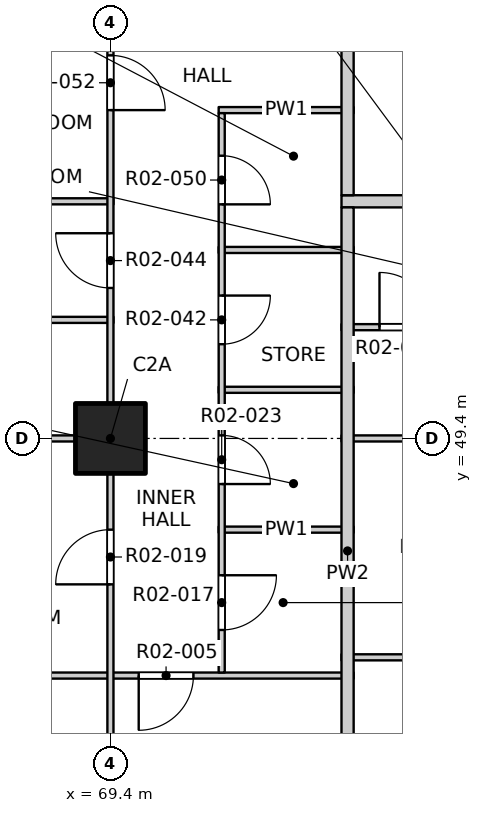
"""IFC4 building model, lengths in metres.
Left out: names, types, materials, properties, quantities, classifications, styles, units other than length and angle.
Written with IfcOpenShell. Run it as: python <this file> out.ifc"""

import sys

from ifc_helpers import new_model, si_unit, direction, frame, frame_2d, origin, origin_2d, place, context, subcontext, project, spatial, rectangle, extrude, element, fill, save


model = new_model("IFC4")
c1 = context("Model", 3, precision=1e-05, world=origin(), true_north=direction((0.0, 1.0)))
c2 = subcontext(c1, "Body", "Model", "MODEL_VIEW")
j1 = project(units=[si_unit("LENGTHUNIT", "METRE"), si_unit("PLANEANGLEUNIT", "RADIAN")], contexts=[c1])
p1 = place(None, origin())
s1 = spatial("IfcSite", under=j1, at=p1, CompositionType="ELEMENT")
p2 = place(p1, origin())
s2 = spatial("IfcBuilding", under=s1, at=p2, CompositionType="ELEMENT")
p3 = place(p2, frame((0.0, 0.0, 29.7)))
s3 = spatial("IfcBuildingStorey", under=s2, at=p3, CompositionType="ELEMENT", Elevation=29.7)
p4 = place(p3, frame((69.4, 49.4, -0.25), z_axis=(0.0, 0.0, 1.0), x_axis=(1.0, 0.0, 0.0)))
e1 = element("IfcColumn", 1, at=p4, inside=s3, PredefinedType="COLUMN", context=c2, shape_type="SweptSolid", body=[
    extrude(rectangle(XDim=1.15, YDim=1.15, at=origin_2d()), origin(), (0.0, 0.0, 1.0), 3.4),
])
p5 = place(p3, frame((61.9, 45.5, 0.0), z_axis=(0.0, 0.0, 1.0), x_axis=(1.0, 0.0, 0.0)))
e2 = element("IfcWall", 2, at=p5, inside=s3, PredefinedType="PARTITIONING", context=c2, shape_type="SweptSolid", body=[
    extrude(rectangle(XDim=11.5, YDim=0.1, at=frame_2d((5.75, 0.0))), origin(), (0.0, 0.0, 1.0), 3.15),
])
p6 = place(p5, frame((7.965, 0.0, 0.0)))
e3 = element("IfcOpeningElement", 3, at=p6, cuts=e2, PredefinedType="OPENING", context=c2, shape_type="SweptSolid", body=[
    extrude(rectangle(XDim=0.9, YDim=2.1, at=frame_2d((0.45, 1.05))), frame((0.0, 0.06, 0.0), z_axis=(0.0, -1.0, 0.0), x_axis=(1.0, 0.0, 0.0)), (0.0, 0.0, 1.0), 0.12),
])
p7 = place(p3, frame((73.2, 45.8, 0.0), z_axis=(0.0, 0.0, 1.0), x_axis=(1.0, 0.0, 0.0)))
e4 = element("IfcWall", 4, at=p7, inside=s3, PredefinedType="PARTITIONING", context=c2, shape_type="SweptSolid", body=[
    extrude(rectangle(XDim=8.0, YDim=0.1, at=frame_2d((4.0, 0.0))), origin(), (0.0, 0.0, 1.0), 3.15),
])
p8 = place(p7, frame((1.45, 0.0, 0.0)))
e5 = element("IfcOpeningElement", 5, at=p8, cuts=e4, PredefinedType="OPENING", context=c2, shape_type="SweptSolid", body=[
    extrude(rectangle(XDim=1.2, YDim=2.1, at=frame_2d((0.6, 1.05))), frame((0.0, 0.06, 0.0), z_axis=(0.0, -1.0, 0.0), x_axis=(1.0, 0.0, 0.0)), (0.0, 0.0, 1.0), 0.12),
])
p9 = place(p7, frame((4.525, 0.0, 0.0)))
e6 = element("IfcOpeningElement", 6, at=p9, cuts=e4, PredefinedType="OPENING", context=c2, shape_type="SweptSolid", body=[
    extrude(rectangle(XDim=0.9, YDim=2.1, at=frame_2d((0.45, 1.05))), frame((0.0, 0.06, 0.0), z_axis=(0.0, -1.0, 0.0), x_axis=(1.0, 0.0, 0.0)), (0.0, 0.0, 1.0), 0.12),
])
p10 = place(p7, frame((6.475, 0.0, 0.0)))
e7 = element("IfcOpeningElement", 7, at=p10, cuts=e4, PredefinedType="OPENING", context=c2, shape_type="SweptSolid", body=[
    extrude(rectangle(XDim=0.9, YDim=2.1, at=frame_2d((0.45, 1.05))), frame((0.0, 0.06, 0.0), z_axis=(0.0, -1.0, 0.0), x_axis=(1.0, 0.0, 0.0)), (0.0, 0.0, 1.0), 0.12),
])
p11 = place(p3, frame((71.18, 47.9, 0.0), z_axis=(0.0, 0.0, 1.0), x_axis=(1.0, 0.0, 0.0)))
e8 = element("IfcWall", 8, at=p11, inside=s3, PredefinedType="PARTITIONING", context=c2, shape_type="SweptSolid", body=[
    extrude(rectangle(XDim=2.22, YDim=0.1, at=frame_2d((1.11, 0.0))), origin(), (0.0, 0.0, 1.0), 3.15),
])
p12 = place(p3, frame((61.9, 49.4, 0.0), z_axis=(0.0, 0.0, 1.0), x_axis=(1.0, 0.0, 0.0)))
e9 = element("IfcWall", 9, at=p12, inside=s3, PredefinedType="PARTITIONING", context=c2, shape_type="SweptSolid", body=[
    extrude(rectangle(XDim=7.55, YDim=0.1, at=frame_2d((3.775, 0.0))), origin(), (0.0, 0.0, 1.0), 2.55),
])
p13 = place(p3, frame((73.2, 49.4, 0.0), z_axis=(0.0, 0.0, 1.0), x_axis=(1.0, 0.0, 0.0)))
e10 = element("IfcWall", 10, at=p13, inside=s3, PredefinedType="PARTITIONING", context=c2, shape_type="SweptSolid", body=[
    extrude(rectangle(XDim=23.6, YDim=0.1, at=frame_2d((11.8, 0.0))), origin(), (0.0, 0.0, 1.0), 3.15),
])
p14 = place(p13, frame((1.6, 0.0, 0.0)))
e11 = element("IfcOpeningElement", 11, at=p14, cuts=e10, PredefinedType="OPENING", context=c2, shape_type="SweptSolid", body=[
    extrude(rectangle(XDim=0.9, YDim=2.1, at=frame_2d((0.45, 1.05))), frame((0.0, 0.06, 0.0), z_axis=(0.0, -1.0, 0.0), x_axis=(1.0, 0.0, 0.0)), (0.0, 0.0, 1.0), 0.12),
])
p15 = place(p13, frame((6.475, 0.0, 0.0)))
e12 = element("IfcOpeningElement", 12, at=p15, cuts=e10, PredefinedType="OPENING", context=c2, shape_type="SweptSolid", body=[
    extrude(rectangle(XDim=0.9, YDim=2.1, at=frame_2d((0.45, 1.05))), frame((0.0, 0.06, 0.0), z_axis=(0.0, -1.0, 0.0), x_axis=(1.0, 0.0, 0.0)), (0.0, 0.0, 1.0), 0.12),
])
p16 = place(p13, frame((10.2, 0.0, 0.0)))
e13 = element("IfcOpeningElement", 13, at=p16, cuts=e10, PredefinedType="OPENING", context=c2, shape_type="SweptSolid", body=[
    extrude(rectangle(XDim=0.9, YDim=2.1, at=frame_2d((0.45, 1.05))), frame((0.0, 0.06, 0.0), z_axis=(0.0, -1.0, 0.0), x_axis=(1.0, 0.0, 0.0)), (0.0, 0.0, 1.0), 0.12),
])
p17 = place(p13, frame((13.3, 0.0, 0.0)))
e14 = element("IfcOpeningElement", 14, at=p17, cuts=e10, PredefinedType="OPENING", context=c2, shape_type="SweptSolid", body=[
    extrude(rectangle(XDim=0.9, YDim=2.1, at=frame_2d((0.45, 1.05))), frame((0.0, 0.06, 0.0), z_axis=(0.0, -1.0, 0.0), x_axis=(1.0, 0.0, 0.0)), (0.0, 0.0, 1.0), 0.12),
])
p18 = place(p13, frame((18.0, 0.0, 0.0)))
e15 = element("IfcOpeningElement", 15, at=p18, cuts=e10, PredefinedType="OPENING", context=c2, shape_type="SweptSolid", body=[
    extrude(rectangle(XDim=0.9, YDim=2.1, at=frame_2d((0.45, 1.05))), frame((0.0, 0.06, 0.0), z_axis=(0.0, -1.0, 0.0), x_axis=(1.0, 0.0, 0.0)), (0.0, 0.0, 1.0), 0.12),
])
p19 = place(p13, frame((21.1, 0.0, 0.0)))
e16 = element("IfcOpeningElement", 16, at=p19, cuts=e10, PredefinedType="OPENING", context=c2, shape_type="SweptSolid", body=[
    extrude(rectangle(XDim=0.9, YDim=2.1, at=frame_2d((0.45, 1.05))), frame((0.0, 0.06, 0.0), z_axis=(0.0, -1.0, 0.0), x_axis=(1.0, 0.0, 0.0)), (0.0, 0.0, 1.0), 0.12),
])
p20 = place(p3, frame((71.18, 50.2, 0.0), z_axis=(0.0, 0.0, 1.0), x_axis=(1.0, 0.0, 0.0)))
e17 = element("IfcWall", 17, at=p20, inside=s3, PredefinedType="PARTITIONING", context=c2, shape_type="SweptSolid", body=[
    extrude(rectangle(XDim=2.22, YDim=0.1, at=frame_2d((1.11, 0.0))), origin(), (0.0, 0.0, 1.0), 3.15),
])
p21 = place(p3, frame((73.2, 51.23, 0.0), z_axis=(0.0, 0.0, 1.0), x_axis=(1.0, 0.0, 0.0)))
e18 = element("IfcWall", 18, at=p21, inside=s3, PredefinedType="PARTITIONING", context=c2, shape_type="SweptSolid", body=[
    extrude(rectangle(XDim=4.7, YDim=0.1, at=frame_2d((2.35, 0.0))), origin(), (0.0, 0.0, 1.0), 3.15),
])
p22 = place(p21, frame((0.625, 0.0, 0.0)))
e19 = element("IfcOpeningElement", 19, at=p22, cuts=e18, PredefinedType="OPENING", context=c2, shape_type="SweptSolid", body=[
    extrude(rectangle(XDim=0.9, YDim=2.1, at=frame_2d((0.45, 1.05))), frame((0.0, 0.06, 0.0), z_axis=(0.0, -1.0, 0.0), x_axis=(1.0, 0.0, 0.0)), (0.0, 0.0, 1.0), 0.12),
])
p23 = place(p21, frame((2.9, 0.0, 0.0)))
e20 = element("IfcOpeningElement", 20, at=p23, cuts=e18, PredefinedType="OPENING", context=c2, shape_type="SweptSolid", body=[
    extrude(rectangle(XDim=0.9, YDim=2.1, at=frame_2d((0.45, 1.05))), frame((0.0, 0.06, 0.0), z_axis=(0.0, -1.0, 0.0), x_axis=(1.0, 0.0, 0.0)), (0.0, 0.0, 1.0), 0.12),
])
p24 = place(p3, frame((66.05, 51.35, 0.0), z_axis=(0.0, 0.0, 1.0), x_axis=(1.0, 0.0, 0.0)))
e21 = element("IfcWall", 21, at=p24, inside=s3, PredefinedType="PARTITIONING", context=c2, shape_type="SweptSolid", body=[
    extrude(rectangle(XDim=3.4, YDim=0.1, at=frame_2d((1.7, 0.0))), origin(), (0.0, 0.0, 1.0), 3.15),
])
p25 = place(p3, frame((71.18, 52.5, 0.0), z_axis=(0.0, 0.0, 1.0), x_axis=(1.0, 0.0, 0.0)))
e22 = element("IfcWall", 22, at=p25, inside=s3, PredefinedType="PARTITIONING", context=c2, shape_type="SweptSolid", body=[
    extrude(rectangle(XDim=2.22, YDim=0.1, at=frame_2d((1.11, 0.0))), origin(), (0.0, 0.0, 1.0), 3.15),
])
p26 = place(p3, frame((61.9, 53.3, 0.0), z_axis=(0.0, 0.0, 1.0), x_axis=(1.0, 0.0, 0.0)))
e23 = element("IfcWall", 23, at=p26, inside=s3, PredefinedType="PARTITIONING", context=c2, shape_type="SweptSolid", body=[
    extrude(rectangle(XDim=7.55, YDim=0.1, at=frame_2d((3.775, 0.0))), origin(), (0.0, 0.0, 1.0), 3.15),
])
p27 = place(p3, frame((73.2, 53.3, 0.0), z_axis=(0.0, 0.0, 1.0), x_axis=(1.0, 0.0, 0.0)))
e24 = element("IfcWall", 24, at=p27, inside=s3, PredefinedType="PARTITIONING", context=c2, shape_type="SweptSolid", body=[
    extrude(rectangle(XDim=23.6, YDim=0.2, at=frame_2d((11.8, 0.0))), origin(), (0.0, 0.0, 1.0), 3.15),
])
p28 = place(p27, frame((5.925, 0.0, 0.0)))
e25 = element("IfcOpeningElement", 25, at=p28, cuts=e24, PredefinedType="OPENING", context=c2, shape_type="SweptSolid", body=[
    extrude(rectangle(XDim=1.0, YDim=2.1, at=frame_2d((0.5, 1.05))), frame((0.0, 0.11, 0.0), z_axis=(0.0, -1.0, 0.0), x_axis=(1.0, 0.0, 0.0)), (0.0, 0.0, 1.0), 0.22),
])
p29 = place(p27, frame((17.925, 0.0, 0.0)))
e26 = element("IfcOpeningElement", 26, at=p29, cuts=e24, PredefinedType="OPENING", context=c2, shape_type="SweptSolid", body=[
    extrude(rectangle(XDim=1.0, YDim=2.1, at=frame_2d((0.5, 1.05))), frame((0.0, 0.11, 0.0), z_axis=(0.0, -1.0, 0.0), x_axis=(1.0, 0.0, 0.0)), (0.0, 0.0, 1.0), 0.22),
])
p30 = place(p3, frame((71.18, 54.8, 0.0), z_axis=(0.0, 0.0, 1.0), x_axis=(1.0, 0.0, 0.0)))
e27 = element("IfcWall", 27, at=p30, inside=s3, PredefinedType="PARTITIONING", context=c2, shape_type="SweptSolid", body=[
    extrude(rectangle(XDim=2.22, YDim=0.1, at=frame_2d((1.11, 0.0))), origin(), (0.0, 0.0, 1.0), 3.15),
])
p31 = place(p3, frame((69.4, 41.9, 0.0), z_axis=(0.0, 0.0, 1.0), x_axis=(0.0, 1.0, 0.0)))
e28 = element("IfcWall", 28, at=p31, inside=s3, PredefinedType="PARTITIONING", context=c2, shape_type="SweptSolid", body=[
    extrude(rectangle(XDim=7.5, YDim=0.1, at=frame_2d((3.75, 0.0))), origin(), (0.0, 0.0, 1.0), 2.55),
])
p32 = place(p31, frame((1.2, 0.0, 0.0)))
e29 = element("IfcOpeningElement", 29, at=p32, cuts=e28, PredefinedType="OPENING", context=c2, shape_type="SweptSolid", body=[
    extrude(rectangle(XDim=0.9, YDim=2.1, at=frame_2d((0.45, 1.05))), frame((0.0, 0.06, 0.0), z_axis=(0.0, -1.0, 0.0), x_axis=(1.0, 0.0, 0.0)), (0.0, 0.0, 1.0), 0.12),
])
p33 = place(p31, frame((5.1, 0.0, 0.0)))
e30 = element("IfcOpeningElement", 30, at=p33, cuts=e28, PredefinedType="OPENING", context=c2, shape_type="SweptSolid", body=[
    extrude(rectangle(XDim=0.9, YDim=2.1, at=frame_2d((0.45, 1.05))), frame((0.0, 0.06, 0.0), z_axis=(0.0, -1.0, 0.0), x_axis=(1.0, 0.0, 0.0)), (0.0, 0.0, 1.0), 0.12),
])
p34 = place(p3, frame((69.4, 49.4, 0.0), z_axis=(0.0, 0.0, 1.0), x_axis=(0.0, 1.0, 0.0)))
e31 = element("IfcWall", 31, at=p34, inside=s3, PredefinedType="PARTITIONING", context=c2, shape_type="SweptSolid", body=[
    extrude(rectangle(XDim=31.2, YDim=0.1, at=frame_2d((15.6, 0.0))), origin(), (0.0, 0.0, 1.0), 3.15),
])
p35 = place(p34, frame((2.475, 0.0, 0.0)))
e32 = element("IfcOpeningElement", 32, at=p35, cuts=e31, PredefinedType="OPENING", context=c2, shape_type="SweptSolid", body=[
    extrude(rectangle(XDim=0.9, YDim=2.1, at=frame_2d((0.45, 1.05))), frame((0.0, 0.06, 0.0), z_axis=(0.0, -1.0, 0.0), x_axis=(1.0, 0.0, 0.0)), (0.0, 0.0, 1.0), 0.12),
])
p36 = place(p34, frame((5.4, 0.0, 0.0)))
e33 = element("IfcOpeningElement", 33, at=p36, cuts=e31, PredefinedType="OPENING", context=c2, shape_type="SweptSolid", body=[
    extrude(rectangle(XDim=0.9, YDim=2.1, at=frame_2d((0.45, 1.05))), frame((0.0, 0.06, 0.0), z_axis=(0.0, -1.0, 0.0), x_axis=(1.0, 0.0, 0.0)), (0.0, 0.0, 1.0), 0.12),
])
p37 = place(p34, frame((10.275, 0.0, 0.0)))
e34 = element("IfcOpeningElement", 34, at=p37, cuts=e31, PredefinedType="OPENING", context=c2, shape_type="SweptSolid", body=[
    extrude(rectangle(XDim=0.9, YDim=2.1, at=frame_2d((0.45, 1.05))), frame((0.0, 0.06, 0.0), z_axis=(0.0, -1.0, 0.0), x_axis=(1.0, 0.0, 0.0)), (0.0, 0.0, 1.0), 0.12),
])
p38 = place(p34, frame((14.0, 0.0, 0.0)))
e35 = element("IfcOpeningElement", 35, at=p38, cuts=e31, PredefinedType="OPENING", context=c2, shape_type="SweptSolid", body=[
    extrude(rectangle(XDim=0.9, YDim=2.1, at=frame_2d((0.45, 1.05))), frame((0.0, 0.06, 0.0), z_axis=(0.0, -1.0, 0.0), x_axis=(1.0, 0.0, 0.0)), (0.0, 0.0, 1.0), 0.12),
])
p39 = place(p34, frame((17.1, 0.0, 0.0)))
e36 = element("IfcOpeningElement", 36, at=p39, cuts=e31, PredefinedType="OPENING", context=c2, shape_type="SweptSolid", body=[
    extrude(rectangle(XDim=0.9, YDim=2.1, at=frame_2d((0.45, 1.05))), frame((0.0, 0.06, 0.0), z_axis=(0.0, -1.0, 0.0), x_axis=(1.0, 0.0, 0.0)), (0.0, 0.0, 1.0), 0.12),
])
p40 = place(p34, frame((21.8, 0.0, 0.0)))
e37 = element("IfcOpeningElement", 37, at=p40, cuts=e31, PredefinedType="OPENING", context=c2, shape_type="SweptSolid", body=[
    extrude(rectangle(XDim=0.9, YDim=2.1, at=frame_2d((0.45, 1.05))), frame((0.0, 0.06, 0.0), z_axis=(0.0, -1.0, 0.0), x_axis=(1.0, 0.0, 0.0)), (0.0, 0.0, 1.0), 0.12),
])
p41 = place(p34, frame((25.875, 0.0, 0.0)))
e38 = element("IfcOpeningElement", 38, at=p41, cuts=e31, PredefinedType="OPENING", context=c2, shape_type="SweptSolid", body=[
    extrude(rectangle(XDim=0.9, YDim=2.1, at=frame_2d((0.45, 1.05))), frame((0.0, 0.06, 0.0), z_axis=(0.0, -1.0, 0.0), x_axis=(1.0, 0.0, 0.0)), (0.0, 0.0, 1.0), 0.12),
])
p42 = place(p34, frame((29.6, 0.0, 0.0)))
e39 = element("IfcOpeningElement", 39, at=p42, cuts=e31, PredefinedType="OPENING", context=c2, shape_type="SweptSolid", body=[
    extrude(rectangle(XDim=0.9, YDim=2.1, at=frame_2d((0.45, 1.05))), frame((0.0, 0.06, 0.0), z_axis=(0.0, -1.0, 0.0), x_axis=(1.0, 0.0, 0.0)), (0.0, 0.0, 1.0), 0.12),
])
p43 = place(p3, frame((71.23, 45.55, 0.0), z_axis=(0.0, 0.0, 1.0), x_axis=(0.0, 1.0, 0.0)))
e40 = element("IfcWall", 40, at=p43, inside=s3, PredefinedType="PARTITIONING", context=c2, shape_type="SweptSolid", body=[
    extrude(rectangle(XDim=9.2, YDim=0.1, at=frame_2d((4.6, 0.0))), origin(), (0.0, 0.0, 1.0), 3.15),
])
p44 = place(p43, frame((0.7, 0.0, 0.0)))
e41 = element("IfcOpeningElement", 41, at=p44, cuts=e40, PredefinedType="OPENING", context=c2, shape_type="SweptSolid", body=[
    extrude(rectangle(XDim=0.9, YDim=2.1, at=frame_2d((0.45, 1.05))), frame((0.0, 0.06, 0.0), z_axis=(0.0, -1.0, 0.0), x_axis=(1.0, 0.0, 0.0)), (0.0, 0.0, 1.0), 0.12),
])
p45 = place(p43, frame((3.1, 0.0, 0.0)))
e42 = element("IfcOpeningElement", 42, at=p45, cuts=e40, PredefinedType="OPENING", context=c2, shape_type="SweptSolid", body=[
    extrude(rectangle(XDim=0.8, YDim=2.1, at=frame_2d((0.4, 1.05))), frame((0.0, 0.06, 0.0), z_axis=(0.0, -1.0, 0.0), x_axis=(1.0, 0.0, 0.0)), (0.0, 0.0, 1.0), 0.12),
])
p46 = place(p43, frame((5.4, 0.0, 0.0)))
e43 = element("IfcOpeningElement", 43, at=p46, cuts=e40, PredefinedType="OPENING", context=c2, shape_type="SweptSolid", body=[
    extrude(rectangle(XDim=0.8, YDim=2.1, at=frame_2d((0.4, 1.05))), frame((0.0, 0.06, 0.0), z_axis=(0.0, -1.0, 0.0), x_axis=(1.0, 0.0, 0.0)), (0.0, 0.0, 1.0), 0.12),
])
p47 = place(p43, frame((7.7, 0.0, 0.0)))
e44 = element("IfcOpeningElement", 44, at=p47, cuts=e40, PredefinedType="OPENING", context=c2, shape_type="SweptSolid", body=[
    extrude(rectangle(XDim=0.8, YDim=2.1, at=frame_2d((0.4, 1.05))), frame((0.0, 0.06, 0.0), z_axis=(0.0, -1.0, 0.0), x_axis=(1.0, 0.0, 0.0)), (0.0, 0.0, 1.0), 0.12),
])
p48 = place(p3, frame((73.3, 41.9, 0.0), z_axis=(0.0, 0.0, 1.0), x_axis=(0.0, 1.0, 0.0)))
e45 = element("IfcWall", 45, at=p48, inside=s3, PredefinedType="PARTITIONING", context=c2, shape_type="SweptSolid", body=[
    extrude(rectangle(XDim=11.3, YDim=0.2, at=frame_2d((5.65, 0.0))), origin(), (0.0, 0.0, 1.0), 3.15),
])
p49 = place(p3, frame((73.3, 53.4, 0.0), z_axis=(0.0, 0.0, 1.0), x_axis=(0.0, 1.0, 0.0)))
e46 = element("IfcWall", 46, at=p49, inside=s3, PredefinedType="PARTITIONING", context=c2, shape_type="SweptSolid", body=[
    extrude(rectangle(XDim=31.0, YDim=0.2, at=frame_2d((15.5, 0.0))), origin(), (0.0, 0.0, 1.0), 3.15),
])
p50 = place(p49, frame((2.675, 0.0, 0.0)))
e47 = element("IfcOpeningElement", 47, at=p50, cuts=e46, PredefinedType="OPENING", context=c2, shape_type="SweptSolid", body=[
    extrude(rectangle(XDim=1.0, YDim=2.1, at=frame_2d((0.5, 1.05))), frame((0.0, 0.11, 0.0), z_axis=(0.0, -1.0, 0.0), x_axis=(1.0, 0.0, 0.0)), (0.0, 0.0, 1.0), 0.22),
])
p51 = place(p49, frame((18.125, 0.0, 0.0)))
e48 = element("IfcOpeningElement", 48, at=p51, cuts=e46, PredefinedType="OPENING", context=c2, shape_type="SweptSolid", body=[
    extrude(rectangle(XDim=1.0, YDim=2.1, at=frame_2d((0.5, 1.05))), frame((0.0, 0.11, 0.0), z_axis=(0.0, -1.0, 0.0), x_axis=(1.0, 0.0, 0.0)), (0.0, 0.0, 1.0), 0.22),
])
p52 = place(p49, frame((26.025, 0.0, 0.0)))
e49 = element("IfcOpeningElement", 49, at=p52, cuts=e46, PredefinedType="OPENING", context=c2, shape_type="SweptSolid", body=[
    extrude(rectangle(XDim=1.0, YDim=2.1, at=frame_2d((0.5, 1.05))), frame((0.0, 0.11, 0.0), z_axis=(0.0, -1.0, 0.0), x_axis=(1.0, 0.0, 0.0)), (0.0, 0.0, 1.0), 0.22),
])
p53 = place(p6, origin())
e50 = element("IfcDoor", 50, at=p53, inside=s3, OperationType="SINGLE_SWING_RIGHT", PredefinedType="DOOR", context=c2, shape_type="SweptSolid", body=[
    extrude(rectangle(XDim=0.9, YDim=2.1, at=frame_2d((0.45, 1.05))), frame((0.0, 0.025, 0.0), z_axis=(0.0, -1.0, 0.0), x_axis=(1.0, 0.0, 0.0)), (0.0, 0.0, 1.0), 0.05),
])
fill(e3, e50)
p54 = place(p44, origin())
e51 = element("IfcDoor", 51, at=p54, inside=s3, OperationType="SINGLE_SWING_LEFT", PredefinedType="DOOR", context=c2, shape_type="SweptSolid", body=[
    extrude(rectangle(XDim=0.9, YDim=2.1, at=frame_2d((0.45, 1.05))), frame((0.0, 0.025, 0.0), z_axis=(0.0, -1.0, 0.0), x_axis=(1.0, 0.0, 0.0)), (0.0, 0.0, 1.0), 0.05),
])
fill(e41, e51)
p55 = place(p33, origin())
e52 = element("IfcDoor", 52, at=p55, inside=s3, OperationType="SINGLE_SWING_LEFT", PredefinedType="DOOR", context=c2, shape_type="SweptSolid", body=[
    extrude(rectangle(XDim=0.9, YDim=2.1, at=frame_2d((0.45, 1.05))), frame((0.0, 0.025, 0.0), z_axis=(0.0, -1.0, 0.0), x_axis=(1.0, 0.0, 0.0)), (0.0, 0.0, 1.0), 0.05),
])
fill(e30, e52)
p56 = place(p45, origin())
e53 = element("IfcDoor", 53, at=p56, inside=s3, OperationType="SINGLE_SWING_RIGHT", PredefinedType="DOOR", context=c2, shape_type="SweptSolid", body=[
    extrude(rectangle(XDim=0.8, YDim=2.1, at=frame_2d((0.4, 1.05))), frame((0.0, 0.025, 0.0), z_axis=(0.0, -1.0, 0.0), x_axis=(1.0, 0.0, 0.0)), (0.0, 0.0, 1.0), 0.05),
])
fill(e42, e53)
p57 = place(p22, origin())
e54 = element("IfcDoor", 54, at=p57, inside=s3, OperationType="SINGLE_SWING_LEFT", PredefinedType="DOOR", context=c2, shape_type="SweptSolid", body=[
    extrude(rectangle(XDim=0.9, YDim=2.1, at=frame_2d((0.45, 1.05))), frame((0.0, 0.025, 0.0), z_axis=(0.0, -1.0, 0.0), x_axis=(1.0, 0.0, 0.0)), (0.0, 0.0, 1.0), 0.05),
])
fill(e19, e54)
p58 = place(p46, origin())
e55 = element("IfcDoor", 55, at=p58, inside=s3, OperationType="SINGLE_SWING_LEFT", PredefinedType="DOOR", context=c2, shape_type="SweptSolid", body=[
    extrude(rectangle(XDim=0.8, YDim=2.1, at=frame_2d((0.4, 1.05))), frame((0.0, 0.025, 0.0), z_axis=(0.0, -1.0, 0.0), x_axis=(1.0, 0.0, 0.0)), (0.0, 0.0, 1.0), 0.05),
])
fill(e43, e55)
p59 = place(p35, origin())
e56 = element("IfcDoor", 56, at=p59, inside=s3, OperationType="SINGLE_SWING_RIGHT", PredefinedType="DOOR", context=c2, shape_type="SweptSolid", body=[
    extrude(rectangle(XDim=0.9, YDim=2.1, at=frame_2d((0.45, 1.05))), frame((0.0, 0.025, 0.0), z_axis=(0.0, -1.0, 0.0), x_axis=(1.0, 0.0, 0.0)), (0.0, 0.0, 1.0), 0.05),
])
fill(e32, e56)
p60 = place(p47, origin())
e57 = element("IfcDoor", 57, at=p60, inside=s3, OperationType="SINGLE_SWING_RIGHT", PredefinedType="DOOR", context=c2, shape_type="SweptSolid", body=[
    extrude(rectangle(XDim=0.8, YDim=2.1, at=frame_2d((0.4, 1.05))), frame((0.0, 0.025, 0.0), z_axis=(0.0, -1.0, 0.0), x_axis=(1.0, 0.0, 0.0)), (0.0, 0.0, 1.0), 0.05),
])
fill(e44, e57)
p61 = place(p36, origin())
e58 = element("IfcDoor", 58, at=p61, inside=s3, OperationType="SINGLE_SWING_RIGHT", PredefinedType="DOOR", context=c2, shape_type="SweptSolid", body=[
    extrude(rectangle(XDim=0.9, YDim=2.1, at=frame_2d((0.45, 1.05))), frame((0.0, 0.025, 0.0), z_axis=(0.0, -1.0, 0.0), x_axis=(1.0, 0.0, 0.0)), (0.0, 0.0, 1.0), 0.05),
])
fill(e33, e58)
save(model, sys.argv[1])
